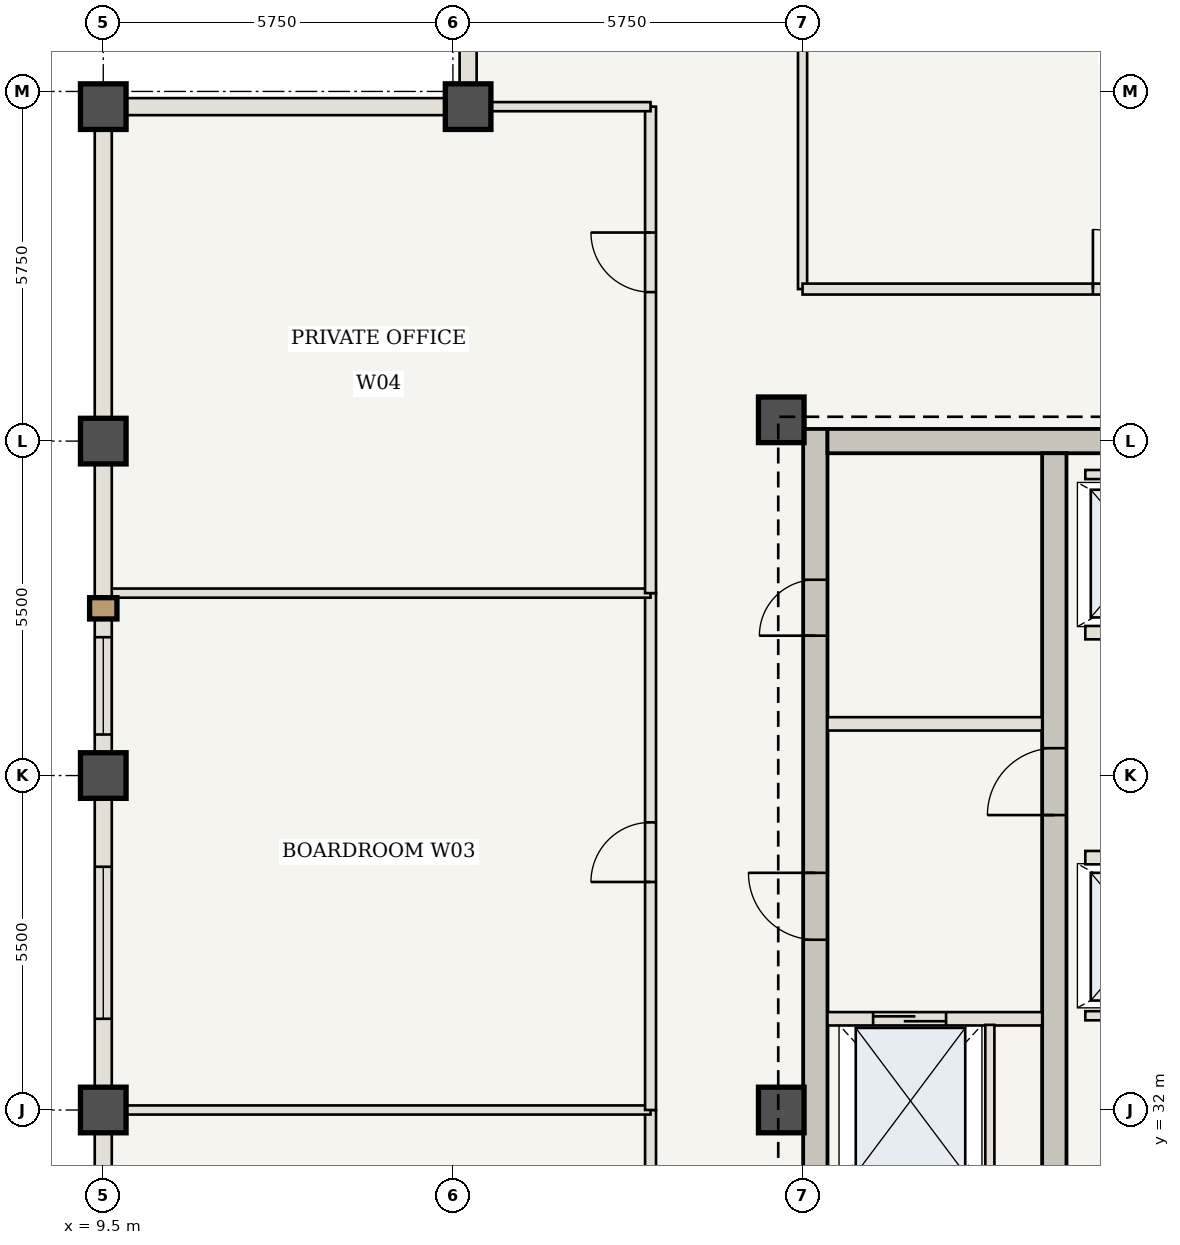
"""IFC4 building model, lengths in metres.
Left out: names, types, materials, properties, quantities, classifications, styles, units other than length and angle.
Written with IfcOpenShell. Run it as: python <this file> out.ifc"""

import sys

from ifc_helpers import new_model, si_unit, direction, frame, frame_2d, origin, origin_2d, place, context, subcontext, project, spatial, rectangle, extrude, element, fill, save


model = new_model("IFC4")
c1 = context("Model", 3, precision=1e-05, world=origin(), true_north=direction((0.0, 1.0)))
c2 = subcontext(c1, "Body", "Model", "MODEL_VIEW")
j1 = project(units=[si_unit("LENGTHUNIT", "METRE"), si_unit("PLANEANGLEUNIT", "RADIAN")], contexts=[c1])
p1 = place(None, origin())
s1 = spatial("IfcSite", under=j1, at=p1, CompositionType="ELEMENT")
p2 = place(p1, origin())
s2 = spatial("IfcBuilding", under=s1, at=p2, CompositionType="ELEMENT")
p3 = place(p2, frame((0.0, 0.0, 266.0)))
s3 = spatial("IfcBuildingStorey", under=s2, at=p3, CompositionType="ELEMENT", Elevation=266.0)
p4 = place(p3, frame((21.21, 30.6, 0.0), z_axis=(0.0, 0.0, 1.0), x_axis=(0.0, 1.0, 0.0)))
e1 = element("IfcWall", 1, at=p4, inside=s3, PredefinedType="SHEAR", context=c2, shape_type="SweptSolid", body=[
    extrude(rectangle(XDim=12.6, YDim=0.4, at=frame_2d((6.3, 0.0))), origin(), (0.0, 0.0, 1.0), 3.85),
])
p5 = place(p4, frame((4.2, 0.0, 0.0)))
e2 = element("IfcOpeningElement", 2, at=p5, cuts=e1, PredefinedType="OPENING", context=c2, shape_type="SweptSolid", body=[
    extrude(rectangle(XDim=1.1, YDim=2.15, at=frame_2d((0.55, 1.075))), frame((0.0, 0.21, 0.0), z_axis=(0.0, -1.0, 0.0), x_axis=(1.0, 0.0, 0.0)), (0.0, 0.0, 1.0), 0.42),
])
p6 = place(p4, frame((9.2, 0.0, 0.0)))
e3 = element("IfcOpeningElement", 3, at=p6, cuts=e1, PredefinedType="OPENING", context=c2, shape_type="SweptSolid", body=[
    extrude(rectangle(XDim=0.92, YDim=2.1, at=frame_2d((0.46, 1.05))), frame((0.0, 0.21, 0.0), z_axis=(0.0, -1.0, 0.0), x_axis=(1.0, 0.0, 0.0)), (0.0, 0.0, 1.0), 0.42),
])
p7 = place(p3, frame((21.41, 43.0, 0.0), z_axis=(0.0, 0.0, 1.0), x_axis=(1.0, 0.0, 0.0)))
e4 = element("IfcWall", 4, at=p7, inside=s3, PredefinedType="SHEAR", context=c2, shape_type="SweptSolid", body=[
    extrude(rectangle(XDim=12.79, YDim=0.4, at=frame_2d((6.395, 0.0))), origin(), (0.0, 0.0, 1.0), 3.85),
])
p8 = place(p3, frame((25.14, 30.6, 0.0), z_axis=(0.0, 0.0, 1.0), x_axis=(0.0, 1.0, 0.0)))
e5 = element("IfcWall", 5, at=p8, inside=s3, PredefinedType="SHEAR", context=c2, shape_type="SweptSolid", body=[
    extrude(rectangle(XDim=12.2, YDim=0.4, at=frame_2d((6.1, 0.0))), origin(), (0.0, 0.0, 1.0), 3.85),
])
p9 = place(p8, frame((6.25, 0.0, 0.0)))
e6 = element("IfcOpeningElement", 6, at=p9, cuts=e5, PredefinedType="OPENING", context=c2, shape_type="SweptSolid", body=[
    extrude(rectangle(XDim=1.1, YDim=2.15, at=frame_2d((0.55, 1.075))), frame((0.0, 0.21, 0.0), z_axis=(0.0, -1.0, 0.0), x_axis=(1.0, 0.0, 0.0)), (0.0, 0.0, 1.0), 0.42),
])
for number, where, z_axis, x_axis in (
    (7, (20.65, 43.35, 0.0), (0.0, 0.0, 1.0), (1.0, 0.0, 0.0)),
    (8, (20.65, 32.0, 0.0), (0.0, 0.0, 1.0), (1.0, 0.0, 0.0)),
    (9, (15.5, 48.5, 0.0), (0.0, 0.0, 1.0), (1.0, 0.0, 0.0)),
    (10, (9.5, 48.5, 0.0), (0.0, 0.0, 1.0), (1.0, 0.0, 0.0)),
    (11, (9.5, 32.0, 0.0), (0.0, 0.0, 1.0), (1.0, 0.0, 0.0)),
    (12, (9.5, 37.5, 0.0), (0.0, 0.0, 1.0), (1.0, 0.0, 0.0)),
    (13, (9.5, 43.0, 0.0), (0.0, 0.0, 1.0), (1.0, 0.0, 0.0)),
):
    element("IfcColumn", number, at=place(p3, frame(where, z_axis=z_axis, x_axis=x_axis)), inside=s3, PredefinedType="COLUMN", context=c2, shape_type="SweptSolid", body=[
        extrude(rectangle(XDim=0.75, YDim=0.75, at=origin_2d()), origin(), (0.0, 0.0, 1.0), 3.85),
    ])
p10 = place(p3, frame((21.41, 33.5, 0.0), z_axis=(0.0, 0.0, 1.0), x_axis=(1.0, 0.0, 0.0)))
e14 = element("IfcWall", 14, at=p10, inside=s3, PredefinedType="STANDARD", context=c2, shape_type="SweptSolid", body=[
    extrude(rectangle(XDim=3.53, YDim=0.22, at=frame_2d((1.765, 0.0))), origin(), (0.0, 0.0, 1.0), 3.685),
])
p11 = place(p10, frame((0.75, 0.0, 0.0)))
e15 = element("IfcOpeningElement", 15, at=p11, cuts=e14, PredefinedType="OPENING", context=c2, shape_type="SweptSolid", body=[
    extrude(rectangle(XDim=1.2, YDim=2.2, at=frame_2d((0.6, 1.1))), frame((0.0, 0.12, 0.0), z_axis=(0.0, -1.0, 0.0), x_axis=(1.0, 0.0, 0.0)), (0.0, 0.0, 1.0), 0.24),
])
p12 = place(p3, frame((24.08, 30.75, 0.0), z_axis=(0.0, 0.0, 1.0), x_axis=(0.0, 1.0, 0.0)))
e16 = element("IfcWall", 16, at=p12, inside=s3, PredefinedType="STANDARD", context=c2, shape_type="SweptSolid", body=[
    extrude(rectangle(XDim=2.65, YDim=0.15, at=frame_2d((1.325, 0.0))), origin(), (0.0, 0.0, 1.0), 3.685),
])
p13 = place(p3, frame((21.41, 38.35, 0.0), z_axis=(0.0, 0.0, 1.0), x_axis=(1.0, 0.0, 0.0)))
e17 = element("IfcWall", 17, at=p13, inside=s3, PredefinedType="STANDARD", context=c2, shape_type="SweptSolid", body=[
    extrude(rectangle(XDim=3.53, YDim=0.22, at=frame_2d((1.765, 0.0))), origin(), (0.0, 0.0, 1.0), 3.685),
])
p14 = place(p3, frame((25.65, 36.15, 0.0), z_axis=(0.0, 0.0, 1.0), x_axis=(1.0, 0.0, 0.0)))
e18 = element("IfcWall", 18, at=p14, inside=s3, PredefinedType="STANDARD", context=c2, shape_type="SweptSolid", body=[
    extrude(rectangle(XDim=4.3, YDim=0.22, at=frame_2d((2.15, 0.0))), origin(), (0.0, 0.0, 1.0), 3.685),
])
p15 = place(p14, frame((0.58, 0.0, 0.0)))
e19 = element("IfcOpeningElement", 19, at=p15, cuts=e18, PredefinedType="OPENING", context=c2, shape_type="SweptSolid", body=[
    extrude(rectangle(XDim=1.1, YDim=2.15, at=frame_2d((0.55, 1.075))), frame((0.0, 0.12, 0.0), z_axis=(0.0, -1.0, 0.0), x_axis=(1.0, 0.0, 0.0)), (0.0, 0.0, 1.0), 0.24),
])
p16 = place(p14, frame((2.55, 0.0, 0.0)))
e20 = element("IfcOpeningElement", 20, at=p16, cuts=e18, PredefinedType="OPENING", context=c2, shape_type="SweptSolid", body=[
    extrude(rectangle(XDim=1.1, YDim=2.15, at=frame_2d((0.55, 1.075))), frame((0.0, 0.12, 0.0), z_axis=(0.0, -1.0, 0.0), x_axis=(1.0, 0.0, 0.0)), (0.0, 0.0, 1.0), 0.24),
])
p17 = place(p3, frame((25.65, 33.55, 0.0), z_axis=(0.0, 0.0, 1.0), x_axis=(1.0, 0.0, 0.0)))
e21 = element("IfcWall", 21, at=p17, inside=s3, PredefinedType="STANDARD", context=c2, shape_type="SweptSolid", body=[
    extrude(rectangle(XDim=4.2, YDim=0.15, at=frame_2d((2.1, 0.0))), origin(), (0.0, 0.0, 1.0), 3.685),
])
p18 = place(p3, frame((25.65, 39.85, 0.0), z_axis=(0.0, 0.0, 1.0), x_axis=(1.0, 0.0, 0.0)))
e22 = element("IfcWall", 22, at=p18, inside=s3, PredefinedType="STANDARD", context=c2, shape_type="SweptSolid", body=[
    extrude(rectangle(XDim=4.3, YDim=0.22, at=frame_2d((2.15, 0.0))), origin(), (0.0, 0.0, 1.0), 3.685),
])
p19 = place(p18, frame((0.58, 0.0, 0.0)))
e23 = element("IfcOpeningElement", 23, at=p19, cuts=e22, PredefinedType="OPENING", context=c2, shape_type="SweptSolid", body=[
    extrude(rectangle(XDim=1.1, YDim=2.15, at=frame_2d((0.55, 1.075))), frame((0.0, 0.12, 0.0), z_axis=(0.0, -1.0, 0.0), x_axis=(1.0, 0.0, 0.0)), (0.0, 0.0, 1.0), 0.24),
])
p20 = place(p18, frame((2.55, 0.0, 0.0)))
e24 = element("IfcOpeningElement", 24, at=p20, cuts=e22, PredefinedType="OPENING", context=c2, shape_type="SweptSolid", body=[
    extrude(rectangle(XDim=1.1, YDim=2.15, at=frame_2d((0.55, 1.075))), frame((0.0, 0.12, 0.0), z_axis=(0.0, -1.0, 0.0), x_axis=(1.0, 0.0, 0.0)), (0.0, 0.0, 1.0), 0.24),
])
p21 = place(p3, frame((25.65, 42.45, 0.0), z_axis=(0.0, 0.0, 1.0), x_axis=(1.0, 0.0, 0.0)))
e25 = element("IfcWall", 25, at=p21, inside=s3, PredefinedType="STANDARD", context=c2, shape_type="SweptSolid", body=[
    extrude(rectangle(XDim=4.2, YDim=0.15, at=frame_2d((2.1, 0.0))), origin(), (0.0, 0.0, 1.0), 3.685),
])
p22 = place(p3, frame((21.0, 45.5, 0.0), z_axis=(0.0, 0.0, 1.0), x_axis=(0.0, 1.0, 0.0)))
e26 = element("IfcWall", 26, at=p22, inside=s3, PredefinedType="STANDARD", context=c2, shape_type="SweptSolid", body=[
    extrude(rectangle(XDim=8.94, YDim=0.15, at=frame_2d((4.47, 0.0))), origin(), (0.0, 0.0, 1.0), 3.685),
])
p23 = place(p3, frame((21.0, 45.5, 0.0), z_axis=(0.0, 0.0, 1.0), x_axis=(1.0, 0.0, 0.0)))
e27 = element("IfcWall", 27, at=p23, inside=s3, PredefinedType="STANDARD", context=c2, shape_type="SweptSolid", body=[
    extrude(rectangle(XDim=10.5, YDim=0.18, at=frame_2d((5.25, 0.0))), origin(), (0.0, 0.0, 1.0), 3.685),
])
p24 = place(p23, frame((4.775, 0.0, 0.0)))
e28 = element("IfcOpeningElement", 28, at=p24, cuts=e27, PredefinedType="OPENING", context=c2, shape_type="SweptSolid", body=[
    extrude(rectangle(XDim=0.98, YDim=2.2, at=frame_2d((0.49, 1.1))), frame((0.0, 0.1, 0.0), z_axis=(0.0, -1.0, 0.0), x_axis=(1.0, 0.0, 0.0)), (0.0, 0.0, 1.0), 0.2),
])
p25 = place(p3, frame((18.5, 23.5, 0.0), z_axis=(0.0, 0.0, 1.0), x_axis=(0.0, 1.0, 0.0)))
e29 = element("IfcWall", 29, at=p25, inside=s3, PredefinedType="STANDARD", context=c2, shape_type="SweptSolid", body=[
    extrude(rectangle(XDim=8.5, YDim=0.18, at=frame_2d((4.25, 0.0))), origin(), (0.0, 0.0, 1.0), 3.685),
])
p26 = place(p25, frame((3.75, 0.0, 0.0)))
e30 = element("IfcOpeningElement", 30, at=p26, cuts=e29, PredefinedType="OPENING", context=c2, shape_type="SweptSolid", body=[
    extrude(rectangle(XDim=0.98, YDim=2.2, at=frame_2d((0.49, 1.1))), frame((0.0, 0.1, 0.0), z_axis=(0.0, -1.0, 0.0), x_axis=(1.0, 0.0, 0.0)), (0.0, 0.0, 1.0), 0.2),
])
p27 = place(p3, frame((9.56, 32.0, 0.0), z_axis=(0.0, 0.0, 1.0), x_axis=(1.0, 0.0, 0.0)))
e31 = element("IfcWall", 31, at=p27, inside=s3, PredefinedType="STANDARD", context=c2, shape_type="SweptSolid", body=[
    extrude(rectangle(XDim=8.94, YDim=0.15, at=frame_2d((4.47, 0.0))), origin(), (0.0, 0.0, 1.0), 3.14),
])
p28 = place(p3, frame((18.5, 32.0, 0.0), z_axis=(0.0, 0.0, 1.0), x_axis=(0.0, 1.0, 0.0)))
e32 = element("IfcWall", 32, at=p28, inside=s3, PredefinedType="STANDARD", context=c2, shape_type="SweptSolid", body=[
    extrude(rectangle(XDim=8.5, YDim=0.18, at=frame_2d((4.25, 0.0))), origin(), (0.0, 0.0, 1.0), 3.685),
])
p29 = place(p28, frame((3.75, 0.0, 0.0)))
e33 = element("IfcOpeningElement", 33, at=p29, cuts=e32, PredefinedType="OPENING", context=c2, shape_type="SweptSolid", body=[
    extrude(rectangle(XDim=0.98, YDim=2.2, at=frame_2d((0.49, 1.1))), frame((0.0, 0.1, 0.0), z_axis=(0.0, -1.0, 0.0), x_axis=(1.0, 0.0, 0.0)), (0.0, 0.0, 1.0), 0.2),
])
p30 = place(p3, frame((9.56, 40.5, 0.0), z_axis=(0.0, 0.0, 1.0), x_axis=(1.0, 0.0, 0.0)))
e34 = element("IfcWall", 34, at=p30, inside=s3, PredefinedType="STANDARD", context=c2, shape_type="SweptSolid", body=[
    extrude(rectangle(XDim=8.94, YDim=0.15, at=frame_2d((4.47, 0.0))), origin(), (0.0, 0.0, 1.0), 3.685),
])
p31 = place(p3, frame((18.5, 40.5, 0.0), z_axis=(0.0, 0.0, 1.0), x_axis=(0.0, 1.0, 0.0)))
e35 = element("IfcWall", 35, at=p31, inside=s3, PredefinedType="STANDARD", context=c2, shape_type="SweptSolid", body=[
    extrude(rectangle(XDim=8.0, YDim=0.18, at=frame_2d((4.0, 0.0))), origin(), (0.0, 0.0, 1.0), 3.685),
])
p32 = place(p31, frame((4.95, 0.0, 0.0)))
e36 = element("IfcOpeningElement", 36, at=p32, cuts=e35, PredefinedType="OPENING", context=c2, shape_type="SweptSolid", body=[
    extrude(rectangle(XDim=0.98, YDim=2.2, at=frame_2d((0.49, 1.1))), frame((0.0, 0.1, 0.0), z_axis=(0.0, -1.0, 0.0), x_axis=(1.0, 0.0, 0.0)), (0.0, 0.0, 1.0), 0.2),
])
p33 = place(p3, frame((15.5, 48.5, 0.0), z_axis=(0.0, 0.0, 1.0), x_axis=(1.0, 0.0, 0.0)))
e37 = element("IfcWall", 37, at=p33, inside=s3, PredefinedType="STANDARD", context=c2, shape_type="SweptSolid", body=[
    extrude(rectangle(XDim=3.0, YDim=0.15, at=frame_2d((1.5, 0.0))), origin(), (0.0, 0.0, 1.0), 3.685),
])
p34 = place(p3, frame((9.5, 26.5, 0.0), z_axis=(0.0, 0.0, 1.0), x_axis=(0.0, 1.0, 0.0)))
e38 = element("IfcWall", 38, at=p34, inside=s3, PredefinedType="USERDEFINED", context=c2, shape_type="SweptSolid", body=[
    extrude(rectangle(XDim=5.5, YDim=0.28, at=frame_2d((2.75, 0.0))), origin(), (0.0, 0.0, 1.0), 2.985),
])
p35 = place(p34, frame((1.5, 0.0, 0.85)))
e39 = element("IfcOpeningElement", 39, at=p35, cuts=e38, PredefinedType="OPENING", context=c2, shape_type="SweptSolid", body=[
    extrude(rectangle(XDim=2.5, YDim=1.935, at=frame_2d((1.25, 0.968))), frame((0.0, 0.15, 0.0), z_axis=(0.0, -1.0, 0.0), x_axis=(1.0, 0.0, 0.0)), (0.0, 0.0, 1.0), 0.3),
])
p36 = place(p3, frame((9.5, 32.0, 0.0), z_axis=(0.0, 0.0, 1.0), x_axis=(0.0, 1.0, 0.0)))
e40 = element("IfcWall", 40, at=p36, inside=s3, PredefinedType="USERDEFINED", context=c2, shape_type="SweptSolid", body=[
    extrude(rectangle(XDim=5.5, YDim=0.28, at=frame_2d((2.75, 0.0))), origin(), (0.0, 0.0, 1.0), 2.985),
])
p37 = place(p36, frame((1.5, 0.0, 0.85)))
e41 = element("IfcOpeningElement", 41, at=p37, cuts=e40, PredefinedType="OPENING", context=c2, shape_type="SweptSolid", body=[
    extrude(rectangle(XDim=2.5, YDim=1.935, at=frame_2d((1.25, 0.968))), frame((0.0, 0.15, 0.0), z_axis=(0.0, -1.0, 0.0), x_axis=(1.0, 0.0, 0.0)), (0.0, 0.0, 1.0), 0.3),
])
p38 = place(p3, frame((9.5, 37.5, 0.0), z_axis=(0.0, 0.0, 1.0), x_axis=(0.0, 1.0, 0.0)))
e42 = element("IfcWall", 42, at=p38, inside=s3, PredefinedType="USERDEFINED", context=c2, shape_type="SweptSolid", body=[
    extrude(rectangle(XDim=5.5, YDim=0.28, at=frame_2d((2.75, 0.0))), origin(), (0.0, 0.0, 1.0), 2.985),
])
p39 = place(p38, frame((0.675, 0.0, 0.85)))
e43 = element("IfcOpeningElement", 43, at=p39, cuts=e42, PredefinedType="OPENING", context=c2, shape_type="SweptSolid", body=[
    extrude(rectangle(XDim=1.6, YDim=1.935, at=frame_2d((0.8, 0.968))), frame((0.0, 0.15, 0.0), z_axis=(0.0, -1.0, 0.0), x_axis=(1.0, 0.0, 0.0)), (0.0, 0.0, 1.0), 0.3),
])
p40 = place(p3, frame((9.5, 43.0, 0.0), z_axis=(0.0, 0.0, 1.0), x_axis=(0.0, 1.0, 0.0)))
e44 = element("IfcWall", 44, at=p40, inside=s3, PredefinedType="USERDEFINED", context=c2, shape_type="SweptSolid", body=[
    extrude(rectangle(XDim=5.5, YDim=0.28, at=frame_2d((2.75, 0.0))), origin(), (0.0, 0.0, 1.0), 2.985),
])
for number, where, z_axis, x_axis in (
    (45, (15.5, 48.5, 0.0), (0.0, 0.0, 1.0), (0.0, 1.0, 0.0)),
    (46, (9.5, 48.5, 0.0), (0.0, 0.0, 1.0), (1.0, 0.0, 0.0)),
):
    element("IfcWall", number, at=place(p3, frame(where, z_axis=z_axis, x_axis=x_axis)), inside=s3, PredefinedType="USERDEFINED", context=c2, shape_type="SweptSolid", body=[
        extrude(rectangle(XDim=6.0, YDim=0.28, at=frame_2d((3.0, 0.0))), origin(), (0.0, 0.0, 1.0), 2.985),
    ])
p41 = place(p5, origin())
e47 = element("IfcDoor", 47, at=p41, inside=s3, OperationType="SINGLE_SWING_RIGHT", PredefinedType="DOOR", context=c2, shape_type="SweptSolid", body=[
    extrude(rectangle(XDim=1.1, YDim=2.15, at=frame_2d((0.55, 1.075))), frame((0.0, 0.025, 0.0), z_axis=(0.0, -1.0, 0.0), x_axis=(1.0, 0.0, 0.0)), (0.0, 0.0, 1.0), 0.05),
])
fill(e2, e47)
p42 = place(p9, origin())
e48 = element("IfcDoor", 48, at=p42, inside=s3, OperationType="SINGLE_SWING_LEFT", PredefinedType="DOOR", context=c2, shape_type="SweptSolid", body=[
    extrude(rectangle(XDim=1.1, YDim=2.15, at=frame_2d((0.55, 1.075))), frame((0.0, 0.025, 0.0), z_axis=(0.0, -1.0, 0.0), x_axis=(1.0, 0.0, 0.0)), (0.0, 0.0, 1.0), 0.05),
])
fill(e6, e48)
p43 = place(p6, origin())
e49 = element("IfcDoor", 49, at=p43, inside=s3, OperationType="SINGLE_SWING_LEFT", PredefinedType="DOOR", context=c2, shape_type="SweptSolid", body=[
    extrude(rectangle(XDim=0.92, YDim=2.1, at=frame_2d((0.46, 1.05))), frame((0.0, 0.025, 0.0), z_axis=(0.0, -1.0, 0.0), x_axis=(1.0, 0.0, 0.0)), (0.0, 0.0, 1.0), 0.05),
])
fill(e3, e49)
p44 = place(p11, origin())
e50 = element("IfcDoor", 50, at=p44, inside=s3, OperationType="DOUBLE_DOOR_SLIDING", PredefinedType="DOOR", context=c2, shape_type="SweptSolid", body=[
    extrude(rectangle(XDim=1.2, YDim=2.2, at=frame_2d((0.6, 1.1))), frame((0.0, 0.025, 0.0), z_axis=(0.0, -1.0, 0.0), x_axis=(1.0, 0.0, 0.0)), (0.0, 0.0, 1.0), 0.05),
])
fill(e15, e50)
p45 = place(p24, origin())
e51 = element("IfcDoor", 51, at=p45, inside=s3, OperationType="SINGLE_SWING_LEFT", PredefinedType="DOOR", context=c2, shape_type="SweptSolid", body=[
    extrude(rectangle(XDim=0.98, YDim=2.2, at=frame_2d((0.49, 1.1))), frame((0.0, 0.025, 0.0), z_axis=(0.0, -1.0, 0.0), x_axis=(1.0, 0.0, 0.0)), (0.0, 0.0, 1.0), 0.05),
])
fill(e28, e51)
p46 = place(p29, origin())
e52 = element("IfcDoor", 52, at=p46, inside=s3, OperationType="SINGLE_SWING_LEFT", PredefinedType="DOOR", context=c2, shape_type="SweptSolid", body=[
    extrude(rectangle(XDim=0.98, YDim=2.2, at=frame_2d((0.49, 1.1))), frame((0.0, 0.025, 0.0), z_axis=(0.0, -1.0, 0.0), x_axis=(1.0, 0.0, 0.0)), (0.0, 0.0, 1.0), 0.05),
])
fill(e33, e52)
p47 = place(p32, origin())
e53 = element("IfcDoor", 53, at=p47, inside=s3, OperationType="SINGLE_SWING_RIGHT", PredefinedType="DOOR", context=c2, shape_type="SweptSolid", body=[
    extrude(rectangle(XDim=0.98, YDim=2.2, at=frame_2d((0.49, 1.1))), frame((0.0, 0.025, 0.0), z_axis=(0.0, -1.0, 0.0), x_axis=(1.0, 0.0, 0.0)), (0.0, 0.0, 1.0), 0.05),
])
fill(e36, e53)
p48 = place(p37, origin())
e54 = element("IfcWindow", 54, at=p48, inside=s3, PartitioningType="SINGLE_PANEL", PredefinedType="WINDOW", context=c2, shape_type="SweptSolid", body=[
    extrude(rectangle(XDim=2.5, YDim=1.935, at=frame_2d((1.25, 0.968))), frame((0.0, 0.03, 0.0), z_axis=(0.0, -1.0, 0.0), x_axis=(1.0, 0.0, 0.0)), (0.0, 0.0, 1.0), 0.06),
])
fill(e41, e54)
p49 = place(p39, origin())
e55 = element("IfcWindow", 55, at=p49, inside=s3, PartitioningType="SINGLE_PANEL", PredefinedType="WINDOW", context=c2, shape_type="SweptSolid", body=[
    extrude(rectangle(XDim=1.6, YDim=1.935, at=frame_2d((0.8, 0.968))), frame((0.0, 0.03, 0.0), z_axis=(0.0, -1.0, 0.0), x_axis=(1.0, 0.0, 0.0)), (0.0, 0.0, 1.0), 0.06),
])
fill(e43, e55)
save(model, sys.argv[1])
